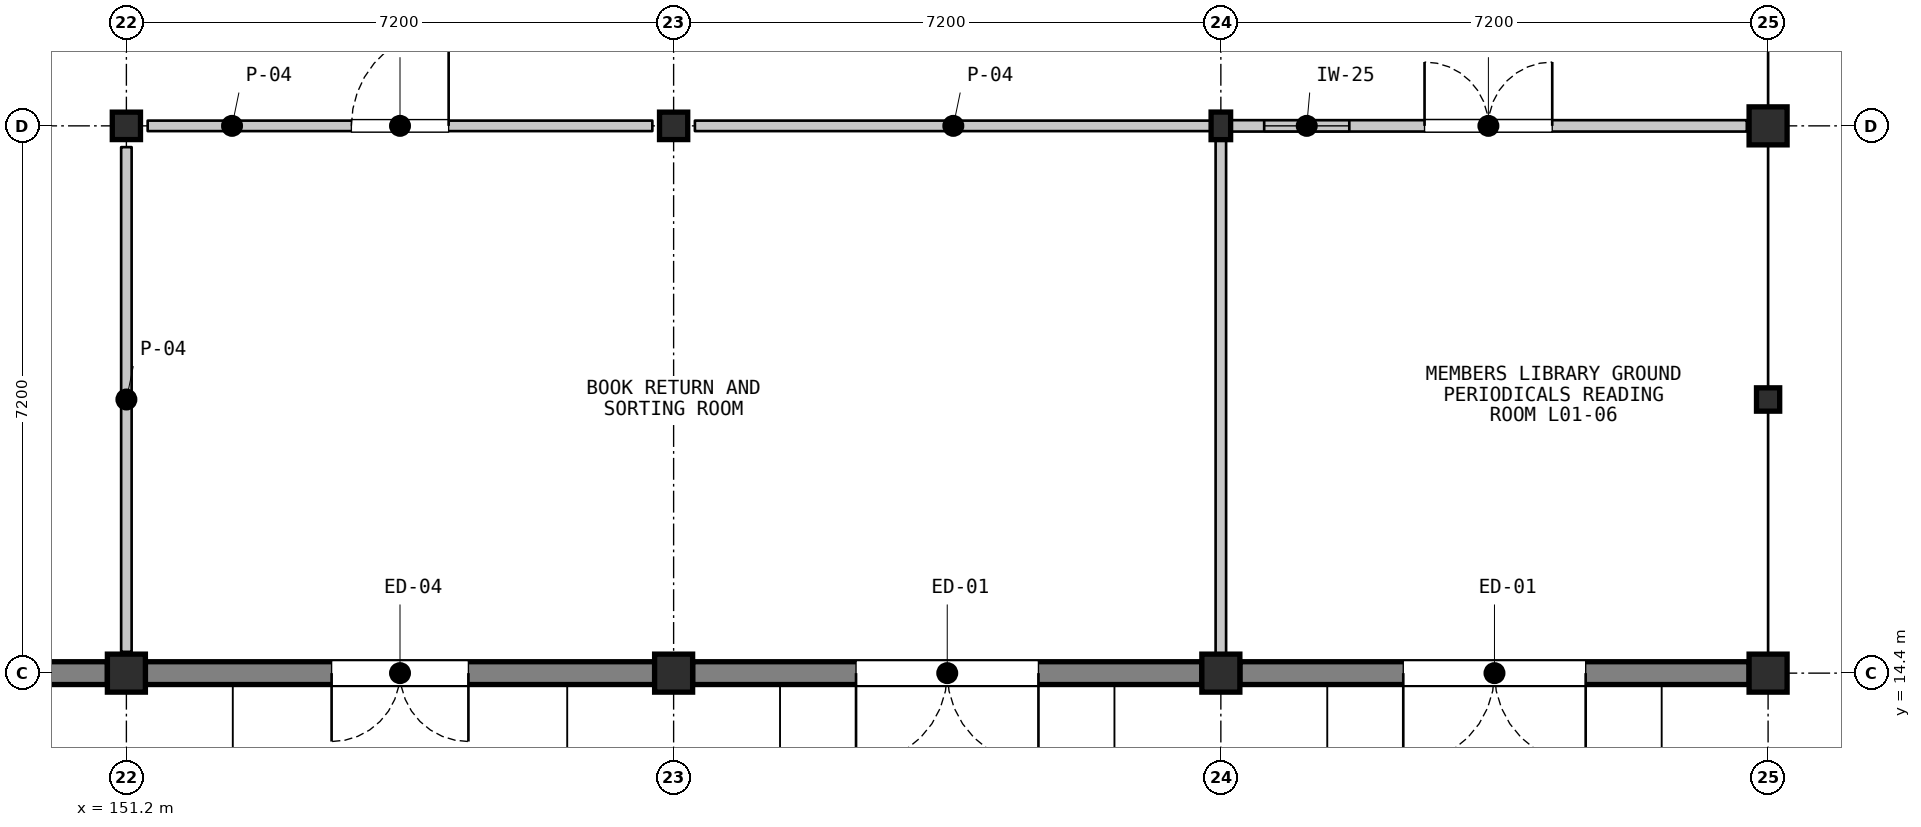
"""IFC4 building model, lengths in metres.
Left out: names, types, materials, properties, quantities, classifications, styles, units other than length and angle.
Written with IfcOpenShell. Run it as: python <this file> out.ifc"""

import sys

from ifc_helpers import new_model, si_unit, direction, frame, frame_2d, origin, origin_2d, place, context, subcontext, project, spatial, rectangle, i_section, extrude, element, fill, save


model = new_model("IFC4")
c1 = context("Model", 3, precision=1e-05, world=origin(), true_north=direction((0.0, 1.0)))
c2 = subcontext(c1, "Body", "Model", "MODEL_VIEW")
j1 = project(units=[si_unit("LENGTHUNIT", "METRE"), si_unit("PLANEANGLEUNIT", "RADIAN")], contexts=[c1])
p1 = place(None, origin())
s1 = spatial("IfcSite", under=j1, at=p1, CompositionType="ELEMENT")
p2 = place(p1, origin())
s2 = spatial("IfcBuilding", under=s1, at=p2, CompositionType="ELEMENT")
p3 = place(p2, origin())
s3 = spatial("IfcBuildingStorey", under=s2, at=p3, CompositionType="ELEMENT", Elevation=0.0)
p4 = place(p3, frame((151.2, 14.4, 0.0), z_axis=(0.0, 0.0, 1.0), x_axis=(1.0, 0.0, 0.0)))
e1 = element("IfcColumn", 1, at=p4, inside=s3, PredefinedType="COLUMN", context=c2, shape_type="SweptSolid", body=[
    extrude(rectangle(XDim=0.5, YDim=0.5, at=origin_2d()), origin(), (0.0, 0.0, 1.0), 5.4),
])
p5 = place(p3, frame((151.2, 21.6, 0.0), z_axis=(0.0, 0.0, 1.0), x_axis=(1.0, 0.0, 0.0)))
e2 = element("IfcColumn", 2, at=p5, inside=s3, PredefinedType="COLUMN", context=c2, shape_type="SweptSolid", body=[
    extrude(i_section(OverallWidth=0.371, OverallDepth=0.361, WebThickness=0.012, FlangeThickness=0.02, FilletRadius=0.015, at=origin_2d()), origin(), (0.0, 0.0, 1.0), 5.4),
])
p6 = place(p3, frame((158.4, 14.4, 0.0), z_axis=(0.0, 0.0, 1.0), x_axis=(1.0, 0.0, 0.0)))
e3 = element("IfcColumn", 3, at=p6, inside=s3, PredefinedType="COLUMN", context=c2, shape_type="SweptSolid", body=[
    extrude(rectangle(XDim=0.5, YDim=0.5, at=origin_2d()), origin(), (0.0, 0.0, 1.0), 5.4),
])
p7 = place(p3, frame((158.4, 21.6, 0.0), z_axis=(0.0, 0.0, 1.0), x_axis=(1.0, 0.0, 0.0)))
e4 = element("IfcColumn", 4, at=p7, inside=s3, PredefinedType="COLUMN", context=c2, shape_type="SweptSolid", body=[
    extrude(i_section(OverallWidth=0.371, OverallDepth=0.361, WebThickness=0.012, FlangeThickness=0.02, FilletRadius=0.015, at=origin_2d()), origin(), (0.0, 0.0, 1.0), 5.4),
])
p8 = place(p3, frame((165.6, 14.4, 0.0), z_axis=(0.0, 0.0, 1.0), x_axis=(1.0, 0.0, 0.0)))
e5 = element("IfcColumn", 5, at=p8, inside=s3, PredefinedType="COLUMN", context=c2, shape_type="SweptSolid", body=[
    extrude(rectangle(XDim=0.5, YDim=0.5, at=origin_2d()), origin(), (0.0, 0.0, 1.0), 5.4),
])
p9 = place(p3, frame((165.6, 21.6, 0.0), z_axis=(0.0, 0.0, 1.0), x_axis=(1.0, 0.0, 0.0)))
e6 = element("IfcColumn", 6, at=p9, inside=s3, PredefinedType="COLUMN", context=c2, shape_type="SweptSolid", body=[
    extrude(i_section(OverallWidth=0.257, OverallDepth=0.363, WebThickness=0.013, FlangeThickness=0.022, FilletRadius=0.015, at=origin_2d()), origin(), (0.0, 0.0, 1.0), 5.4),
])
for number, where, z_axis, x_axis in (
    (7, (172.8, 14.4, 0.0), (0.0, 0.0, 1.0), (1.0, 0.0, 0.0)),
    (8, (172.8, 21.6, 0.0), (0.0, 0.0, 1.0), (1.0, 0.0, 0.0)),
):
    element("IfcColumn", number, at=place(p3, frame(where, z_axis=z_axis, x_axis=x_axis)), inside=s3, PredefinedType="COLUMN", context=c2, shape_type="SweptSolid", body=[
        extrude(rectangle(XDim=0.5, YDim=0.5, at=origin_2d()), origin(), (0.0, 0.0, 1.0), 5.4),
    ])
p10 = place(p3, frame((172.8, 18.0, 0.0), z_axis=(0.0, 0.0, 1.0), x_axis=(1.0, 0.0, 0.0)))
e9 = element("IfcColumn", 9, at=p10, inside=s3, PredefinedType="PILASTER", context=c2, shape_type="SweptSolid", body=[
    extrude(i_section(OverallWidth=0.305, OverallDepth=0.307, WebThickness=0.01, FlangeThickness=0.015, FilletRadius=0.015, at=origin_2d()), origin(), (0.0, 0.0, 1.0), 5.4),
])
p11 = place(p3, frame((150.95, 14.4, 0.0), z_axis=(0.0, 0.0, 1.0), x_axis=(-1.0, 0.0, 0.0)))
e10 = element("IfcWall", 10, at=p11, inside=s3, PredefinedType="SOLIDWALL", context=c2, shape_type="SweptSolid", body=[
    extrude(rectangle(XDim=6.7, YDim=0.3, at=frame_2d((3.35, 0.0))), origin(), (0.0, 0.0, 1.0), 4.598),
])
p12 = place(p11, frame((2.15, 0.0, 0.0)))
e11 = element("IfcOpeningElement", 11, at=p12, cuts=e10, PredefinedType="OPENING", context=c2, shape_type="SweptSolid", body=[
    extrude(rectangle(XDim=2.4, YDim=2.8, at=frame_2d((1.2, 1.4))), frame((0.0, 0.16, 0.0), z_axis=(0.0, -1.0, 0.0), x_axis=(1.0, 0.0, 0.0)), (0.0, 0.0, 1.0), 0.32),
])
p13 = place(p3, frame((158.15, 14.4, 0.0), z_axis=(0.0, 0.0, 1.0), x_axis=(-1.0, 0.0, 0.0)))
e12 = element("IfcWall", 12, at=p13, inside=s3, PredefinedType="SOLIDWALL", context=c2, shape_type="SweptSolid", body=[
    extrude(rectangle(XDim=6.7, YDim=0.3, at=frame_2d((3.35, 0.0))), origin(), (0.0, 0.0, 1.0), 4.598),
])
p14 = place(p13, frame((2.45, 0.0, 0.0)))
e13 = element("IfcOpeningElement", 13, at=p14, cuts=e12, PredefinedType="OPENING", context=c2, shape_type="SweptSolid", body=[
    extrude(rectangle(XDim=1.8, YDim=2.4, at=frame_2d((0.9, 1.2))), frame((0.0, 0.16, 0.0), z_axis=(0.0, -1.0, 0.0), x_axis=(1.0, 0.0, 0.0)), (0.0, 0.0, 1.0), 0.32),
])
p15 = place(p3, frame((165.35, 14.4, 0.0), z_axis=(0.0, 0.0, 1.0), x_axis=(-1.0, 0.0, 0.0)))
e14 = element("IfcWall", 14, at=p15, inside=s3, PredefinedType="SOLIDWALL", context=c2, shape_type="SweptSolid", body=[
    extrude(rectangle(XDim=6.7, YDim=0.3, at=frame_2d((3.35, 0.0))), origin(), (0.0, 0.0, 1.0), 4.598),
])
p16 = place(p15, frame((2.15, 0.0, 0.0)))
e15 = element("IfcOpeningElement", 15, at=p16, cuts=e14, PredefinedType="OPENING", context=c2, shape_type="SweptSolid", body=[
    extrude(rectangle(XDim=2.4, YDim=2.8, at=frame_2d((1.2, 1.4))), frame((0.0, 0.16, 0.0), z_axis=(0.0, -1.0, 0.0), x_axis=(1.0, 0.0, 0.0)), (0.0, 0.0, 1.0), 0.32),
])
p17 = place(p3, frame((172.55, 14.4, 0.0), z_axis=(0.0, 0.0, 1.0), x_axis=(-1.0, 0.0, 0.0)))
e16 = element("IfcWall", 16, at=p17, inside=s3, PredefinedType="SOLIDWALL", context=c2, shape_type="SweptSolid", body=[
    extrude(rectangle(XDim=6.7, YDim=0.3, at=frame_2d((3.35, 0.0))), origin(), (0.0, 0.0, 1.0), 4.598),
])
p18 = place(p17, frame((2.15, 0.0, 0.0)))
e17 = element("IfcOpeningElement", 17, at=p18, cuts=e16, PredefinedType="OPENING", context=c2, shape_type="SweptSolid", body=[
    extrude(rectangle(XDim=2.4, YDim=2.8, at=frame_2d((1.2, 1.4))), frame((0.0, 0.16, 0.0), z_axis=(0.0, -1.0, 0.0), x_axis=(1.0, 0.0, 0.0)), (0.0, 0.0, 1.0), 0.32),
])
p19 = place(p3, frame((151.48, 21.6, 0.0), z_axis=(0.0, 0.0, 1.0), x_axis=(1.0, 0.0, 0.0)))
e18 = element("IfcWall", 18, at=p19, inside=s3, PredefinedType="PARTITIONING", context=c2, shape_type="SweptSolid", body=[
    extrude(rectangle(XDim=6.64, YDim=0.138, at=frame_2d((3.32, 0.0))), origin(), (0.0, 0.0, 1.0), 4.588),
])
p20 = place(p19, frame((2.68, 0.0, 0.0)))
e19 = element("IfcOpeningElement", 19, at=p20, cuts=e18, PredefinedType="OPENING", context=c2, shape_type="SweptSolid", body=[
    extrude(rectangle(XDim=1.28, YDim=2.22, at=frame_2d((0.64, 1.11))), frame((0.0, 0.079, 0.0), z_axis=(0.0, -1.0, 0.0), x_axis=(1.0, 0.0, 0.0)), (0.0, 0.0, 1.0), 0.158),
])
p21 = place(p3, frame((158.68, 21.6, 0.0), z_axis=(0.0, 0.0, 1.0), x_axis=(1.0, 0.0, 0.0)))
e20 = element("IfcWall", 20, at=p21, inside=s3, PredefinedType="PARTITIONING", context=c2, shape_type="SweptSolid", body=[
    extrude(rectangle(XDim=6.8, YDim=0.138, at=frame_2d((3.4, 0.0))), origin(), (0.0, 0.0, 1.0), 4.588),
])
p22 = place(p3, frame((151.2, 14.68, 0.0), z_axis=(0.0, 0.0, 1.0), x_axis=(0.0, 1.0, 0.0)))
e21 = element("IfcWall", 21, at=p22, inside=s3, PredefinedType="PARTITIONING", context=c2, shape_type="SweptSolid", body=[
    extrude(rectangle(XDim=6.64, YDim=0.138, at=frame_2d((3.32, 0.0))), origin(), (0.0, 0.0, 1.0), 4.657),
])
p23 = place(p3, frame((165.6, 21.48, 0.0), z_axis=(0.0, 0.0, 1.0), x_axis=(0.0, -1.0, 0.0)))
e22 = element("IfcWall", 22, at=p23, inside=s3, PredefinedType="PARTITIONING", context=c2, shape_type="SweptSolid", body=[
    extrude(rectangle(XDim=6.96, YDim=0.138, at=frame_2d((3.48, 0.0))), origin(), (0.0, 0.0, 1.0), 4.588),
])
p24 = place(p3, frame((165.72, 21.6, 0.0), z_axis=(0.0, 0.0, 1.0), x_axis=(1.0, 0.0, 0.0)))
e23 = element("IfcWall", 23, at=p24, inside=s3, PredefinedType="PARTITIONING", context=c2, shape_type="SweptSolid", body=[
    extrude(rectangle(XDim=6.8, YDim=0.15, at=frame_2d((3.4, 0.0))), origin(), (0.0, 0.0, 1.0), 4.588),
])
p25 = place(p24, frame((2.56, 0.0, 0.0)))
e24 = element("IfcOpeningElement", 24, at=p25, cuts=e23, PredefinedType="OPENING", context=c2, shape_type="SweptSolid", body=[
    extrude(rectangle(XDim=1.68, YDim=2.35, at=frame_2d((0.84, 1.175))), frame((0.0, 0.085, 0.0), z_axis=(0.0, -1.0, 0.0), x_axis=(1.0, 0.0, 0.0)), (0.0, 0.0, 1.0), 0.17),
])
p26 = place(p24, frame((0.45, 0.0, 1.05)))
e25 = element("IfcOpeningElement", 25, at=p26, cuts=e23, PredefinedType="OPENING", context=c2, shape_type="SweptSolid", body=[
    extrude(rectangle(XDim=1.12, YDim=0.92, at=frame_2d((0.56, 0.46))), frame((0.0, 0.085, 0.0), z_axis=(0.0, -1.0, 0.0), x_axis=(1.0, 0.0, 0.0)), (0.0, 0.0, 1.0), 0.17),
])
p27 = place(p14, origin())
e26 = element("IfcDoor", 26, at=p27, inside=s3, OperationType="DOUBLE_DOOR_SINGLE_SWING", PredefinedType="DOOR", context=c2, shape_type="SweptSolid", body=[
    extrude(rectangle(XDim=1.8, YDim=2.4, at=frame_2d((0.9, 1.2))), frame((0.0, 0.025, 0.0), z_axis=(0.0, -1.0, 0.0), x_axis=(1.0, 0.0, 0.0)), (0.0, 0.0, 1.0), 0.05),
])
fill(e13, e26)
p28 = place(p16, origin())
e27 = element("IfcDoor", 27, at=p28, inside=s3, OperationType="DOUBLE_DOOR_SINGLE_SWING", PredefinedType="DOOR", context=c2, shape_type="SweptSolid", body=[
    extrude(rectangle(XDim=2.4, YDim=2.8, at=frame_2d((1.2, 1.4))), frame((0.0, 0.025, 0.0), z_axis=(0.0, -1.0, 0.0), x_axis=(1.0, 0.0, 0.0)), (0.0, 0.0, 1.0), 0.05),
])
fill(e15, e27)
p29 = place(p18, origin())
e28 = element("IfcDoor", 28, at=p29, inside=s3, OperationType="DOUBLE_DOOR_SINGLE_SWING", PredefinedType="DOOR", context=c2, shape_type="SweptSolid", body=[
    extrude(rectangle(XDim=2.4, YDim=2.8, at=frame_2d((1.2, 1.4))), frame((0.0, 0.025, 0.0), z_axis=(0.0, -1.0, 0.0), x_axis=(1.0, 0.0, 0.0)), (0.0, 0.0, 1.0), 0.05),
])
fill(e17, e28)
p30 = place(p20, origin())
e29 = element("IfcDoor", 29, at=p30, inside=s3, OperationType="SINGLE_SWING_RIGHT", PredefinedType="DOOR", context=c2, shape_type="SweptSolid", body=[
    extrude(rectangle(XDim=1.28, YDim=2.22, at=frame_2d((0.64, 1.11))), frame((0.0, 0.025, 0.0), z_axis=(0.0, -1.0, 0.0), x_axis=(1.0, 0.0, 0.0)), (0.0, 0.0, 1.0), 0.05),
])
fill(e19, e29)
p31 = place(p25, origin())
e30 = element("IfcDoor", 30, at=p31, inside=s3, OperationType="DOUBLE_DOOR_SINGLE_SWING", PredefinedType="DOOR", context=c2, shape_type="SweptSolid", body=[
    extrude(rectangle(XDim=1.68, YDim=2.35, at=frame_2d((0.84, 1.175))), frame((0.0, 0.025, 0.0), z_axis=(0.0, -1.0, 0.0), x_axis=(1.0, 0.0, 0.0)), (0.0, 0.0, 1.0), 0.05),
])
fill(e24, e30)
p32 = place(p26, origin())
e31 = element("IfcWindow", 31, at=p32, inside=s3, PartitioningType="SINGLE_PANEL", PredefinedType="WINDOW", context=c2, shape_type="SweptSolid", body=[
    extrude(rectangle(XDim=1.12, YDim=0.92, at=frame_2d((0.56, 0.46))), frame((0.0, 0.03, 0.0), z_axis=(0.0, -1.0, 0.0), x_axis=(1.0, 0.0, 0.0)), (0.0, 0.0, 1.0), 0.06),
])
fill(e25, e31)
save(model, sys.argv[1])
